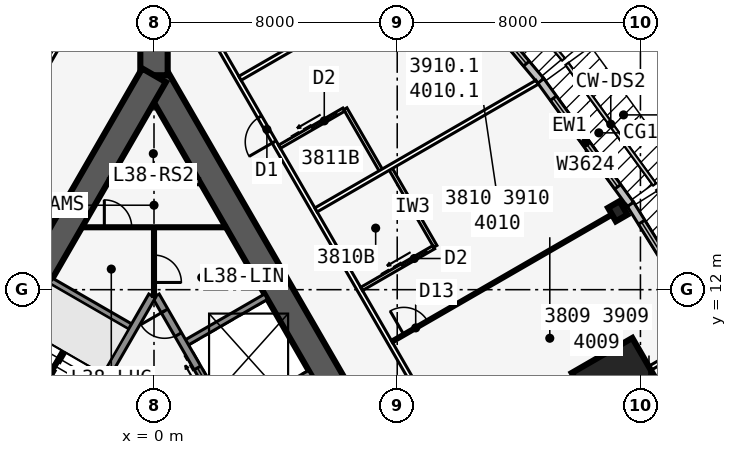
"""IFC4 building model, lengths in metres.
Left out: names, types, materials, properties, quantities, classifications, styles, units other than length and angle.
Written with IfcOpenShell. Run it as: python <this file> out.ifc"""

import sys

from ifc_helpers import new_model, si_unit, direction, frame, frame_2d, origin, origin_2d, place, context, subcontext, project, spatial, rectangle, i_section, extrude, element, fill, save


model = new_model("IFC4")
c1 = context("Model", 3, precision=1e-05, world=origin(), true_north=direction((0.0, 1.0)))
c2 = subcontext(c1, "Body", "Model", "MODEL_VIEW")
j1 = project(units=[si_unit("LENGTHUNIT", "METRE"), si_unit("PLANEANGLEUNIT", "RADIAN")], contexts=[c1])
p1 = place(None, origin())
s1 = spatial("IfcSite", under=j1, at=p1, CompositionType="ELEMENT")
p2 = place(p1, origin())
s2 = spatial("IfcBuilding", under=s1, at=p2, CompositionType="ELEMENT")
p3 = place(p2, frame((0.0, 0.0, 145.3)))
s3 = spatial("IfcBuildingStorey", under=s2, at=p3, CompositionType="ELEMENT", Elevation=145.3)
p4 = place(p3, frame((16.5, -9.526, 0.0), z_axis=(0.0, 0.0, 1.0), x_axis=(-0.499999749417, 0.866025548458, 0.0)))
e1 = element("IfcWall", 1, at=p4, inside=s3, PredefinedType="SHEAR", context=c2, shape_type="SweptSolid", body=[
    extrude(rectangle(XDim=33.0, YDim=0.9, at=frame_2d((16.5, 0.0))), origin(), (0.0, 0.0, 1.0), 3.4),
])
p5 = place(p4, frame((14.15, 0.0, 0.0)))
e2 = element("IfcOpeningElement", 2, at=p5, cuts=e1, PredefinedType="OPENING", context=c2, shape_type="SweptSolid", body=[
    extrude(rectangle(XDim=1.8, YDim=2.13, at=frame_2d((0.9, 1.065))), frame((0.0, 0.46, 0.0), z_axis=(0.0, -1.0, 0.0), x_axis=(1.0, 0.0, 0.0)), (0.0, 0.0, 1.0), 0.92),
])
p6 = place(p4, frame((12.6, 0.0, 0.0)))
e3 = element("IfcOpeningElement", 3, at=p6, cuts=e1, PredefinedType="OPENING", context=c2, shape_type="SweptSolid", body=[
    extrude(rectangle(XDim=1.0, YDim=2.13, at=frame_2d((0.5, 1.065))), frame((0.0, 0.46, 0.0), z_axis=(0.0, -1.0, 0.0), x_axis=(1.0, 0.0, 0.0)), (0.0, 0.0, 1.0), 0.92),
])
p7 = place(p3, frame((5.379, 2.586, 0.0), z_axis=(0.0, 0.0, 1.0), x_axis=(-0.500001375892, 0.866024609411, 0.0)))
e4 = element("IfcWall", 4, at=p7, inside=s3, PredefinedType="SOLIDWALL", context=c2, shape_type="SweptSolid", body=[
    extrude(rectangle(XDim=10.633, YDim=0.25, at=frame_2d((5.316, 0.0))), origin(), (0.0, 0.0, 1.0), 3.235),
])
p8 = place(p7, frame((9.164, 0.0, 0.0)))
e5 = element("IfcOpeningElement", 5, at=p8, cuts=e4, PredefinedType="OPENING", context=c2, shape_type="SweptSolid", body=[
    extrude(rectangle(XDim=0.9, YDim=2.13, at=frame_2d((0.45, 1.065))), frame((0.0, 0.135, 0.0), z_axis=(0.0, -1.0, 0.0), x_axis=(1.0, 0.0, 0.0)), (0.0, 0.0, 1.0), 0.27),
])
p9 = place(p7, frame((1.0, 0.0, 0.0)))
e6 = element("IfcOpeningElement", 6, at=p9, cuts=e4, PredefinedType="OPENING", context=c2, shape_type="SweptSolid", body=[
    extrude(rectangle(XDim=1.1, YDim=2.13, at=frame_2d((0.55, 1.065))), frame((0.0, 0.135, 0.0), z_axis=(0.0, -1.0, 0.0), x_axis=(1.0, 0.0, 0.0)), (0.0, 0.0, 1.0), 0.27),
])
p10 = place(p7, frame((3.9, 0.0, 0.0)))
e7 = element("IfcOpeningElement", 7, at=p10, cuts=e4, PredefinedType="OPENING", context=c2, shape_type="SweptSolid", body=[
    extrude(rectangle(XDim=1.1, YDim=2.13, at=frame_2d((0.55, 1.065))), frame((0.0, 0.135, 0.0), z_axis=(0.0, -1.0, 0.0), x_axis=(1.0, 0.0, 0.0)), (0.0, 0.0, 1.0), 0.27),
])
p11 = place(p7, frame((6.8, 0.0, 0.0)))
e8 = element("IfcOpeningElement", 8, at=p11, cuts=e4, PredefinedType="OPENING", context=c2, shape_type="SweptSolid", body=[
    extrude(rectangle(XDim=1.1, YDim=2.13, at=frame_2d((0.55, 1.065))), frame((0.0, 0.135, 0.0), z_axis=(0.0, -1.0, 0.0), x_axis=(1.0, 0.0, 0.0)), (0.0, 0.0, 1.0), 0.27),
])
for number, where, z_axis, x_axis in (
    (9, (2.429, 7.696, 0.0), (0.0, 0.0, 1.0), (0.866, 0.5, 0.0)),
    (10, (0.979, 10.207, 0.0), (0.0, 0.0, 1.0), (0.866, 0.5, 0.0)),
):
    element("IfcWall", number, at=place(p3, frame(where, z_axis=z_axis, x_axis=x_axis)), inside=s3, PredefinedType="SOLIDWALL", context=c2, shape_type="SweptSolid", body=[
        extrude(rectangle(XDim=3.125, YDim=0.2, at=frame_2d((1.562, 0.0))), origin(), (0.0, 0.0, 1.0), 3.235),
    ])
p12 = place(p3, frame((0.0, 19.052, 0.0), z_axis=(0.0, 0.0, 1.0), x_axis=(-0.499999749417, -0.866025548458, 0.0)))
e11 = element("IfcWall", 11, at=p12, inside=s3, PredefinedType="SHEAR", context=c2, shape_type="SweptSolid", body=[
    extrude(rectangle(XDim=33.0, YDim=0.9, at=frame_2d((16.5, 0.0))), origin(), (0.0, 0.0, 1.0), 3.4),
])
p13 = place(p12, frame((14.15, 0.0, 0.0)))
e12 = element("IfcOpeningElement", 12, at=p13, cuts=e11, PredefinedType="OPENING", context=c2, shape_type="SweptSolid", body=[
    extrude(rectangle(XDim=1.8, YDim=2.13, at=frame_2d((0.9, 1.065))), frame((0.0, 0.46, 0.0), z_axis=(0.0, -1.0, 0.0), x_axis=(1.0, 0.0, 0.0)), (0.0, 0.0, 1.0), 0.92),
])
p14 = place(p12, frame((12.6, 0.0, 0.0)))
e13 = element("IfcOpeningElement", 13, at=p14, cuts=e11, PredefinedType="OPENING", context=c2, shape_type="SweptSolid", body=[
    extrude(rectangle(XDim=1.0, YDim=2.13, at=frame_2d((0.5, 1.065))), frame((0.0, 0.46, 0.0), z_axis=(0.0, -1.0, 0.0), x_axis=(1.0, 0.0, 0.0)), (0.0, 0.0, 1.0), 0.92),
])
p15 = place(p3, frame((-0.062, 11.794, 0.0), z_axis=(0.0, 0.0, 1.0), x_axis=(-0.500006680225, -0.86602154692, 0.0)))
e14 = element("IfcWall", 14, at=p15, inside=s3, PredefinedType="SOLIDWALL", context=c2, shape_type="SweptSolid", body=[
    extrude(rectangle(XDim=7.733, YDim=0.25, at=frame_2d((3.866, 0.0))), origin(), (0.0, 0.0, 1.0), 3.235),
])
p16 = place(p3, frame((-0.679, 10.727, 0.0), z_axis=(0.0, 0.0, 1.0), x_axis=(-0.866022959057, 0.500004234368, 0.0)))
e15 = element("IfcWall", 15, at=p16, inside=s3, PredefinedType="SOLIDWALL", context=c2, shape_type="SweptSolid", body=[
    extrude(rectangle(XDim=3.125, YDim=0.2, at=frame_2d((1.562, 0.0))), origin(), (0.0, 0.0, 1.0), 3.235),
])
p17 = place(p3, frame((0.0, 19.052, 0.0), z_axis=(0.0, 0.0, 1.0), x_axis=(0.0, 1.0, 0.0)))
e16 = element("IfcWall", 16, at=p17, inside=s3, PredefinedType="SHEAR", context=c2, shape_type="SweptSolid", body=[
    extrude(rectangle(XDim=4.746, YDim=0.9, at=frame_2d((2.373, 0.0))), origin(), (0.0, 0.0, 1.0), 3.4),
])
p18 = place(p17, frame((1.8, 0.0, 0.0)))
e17 = element("IfcOpeningElement", 17, at=p18, cuts=e16, PredefinedType="OPENING", context=c2, shape_type="SweptSolid", body=[
    extrude(rectangle(XDim=1.8, YDim=2.13, at=frame_2d((0.9, 1.065))), frame((0.0, 0.46, 0.0), z_axis=(0.0, -1.0, 0.0), x_axis=(1.0, 0.0, 0.0)), (0.0, 0.0, 1.0), 0.92),
])
p19 = place(p3, frame((15.254, 14.58, 0.0), z_axis=(0.0, 0.0, 1.0), x_axis=(0.866025403784, 0.5, 0.0)))
e18 = element("IfcColumn", 18, at=p19, inside=s3, PredefinedType="COLUMN", context=c2, shape_type="SweptSolid", body=[
    extrude(i_section(OverallWidth=0.437, OverallDepth=0.513, WebThickness=0.061, FlangeThickness=0.097, at=origin_2d()), origin(), (0.0, 0.0, 1.0), 3.4),
])
p20 = place(p3, frame((15.312, 8.84, 0.0), z_axis=(0.0, 0.0, 1.0), x_axis=(0.866025403784, 0.5, 0.0)))
e19 = element("IfcColumn", 19, at=p20, inside=s3, PredefinedType="COLUMN", context=c2, shape_type="SweptSolid", body=[
    extrude(rectangle(XDim=2.3, YDim=2.3, at=origin_2d()), origin(), (0.0, 0.0, 1.0), 3.4),
])
p21 = place(p3, frame((18.319, 10.571, 0.0), z_axis=(0.0, 0.0, 1.0), x_axis=(-0.529990167382, 0.84800378683, 0.0)))
e20 = element("IfcWall", 20, at=p21, inside=s3, PredefinedType="STANDARD", context=c2, shape_type="SweptSolid", body=[
    extrude(rectangle(XDim=5.003, YDim=0.25, at=frame_2d((2.501, 0.0))), origin(), (0.0, 0.0, 1.0), 3.235),
])
p22 = place(p21, frame((0.701, 0.0, 0.45)))
e21 = element("IfcOpeningElement", 21, at=p22, cuts=e20, PredefinedType="OPENING", context=c2, shape_type="SweptSolid", body=[
    extrude(rectangle(XDim=3.6, YDim=2.4, at=frame_2d((1.8, 1.2))), frame((0.0, 0.135, 0.0), z_axis=(0.0, -1.0, 0.0), x_axis=(1.0, 0.0, 0.0)), (0.0, 0.0, 1.0), 0.27),
])
p23 = place(p3, frame((15.672, 14.807, 0.0), z_axis=(0.0, 0.0, 1.0), x_axis=(-0.587669188412, 0.809101307001, 0.0)))
e22 = element("IfcWall", 22, at=p23, inside=s3, PredefinedType="STANDARD", context=c2, shape_type="SweptSolid", body=[
    extrude(rectangle(XDim=5.028, YDim=0.25, at=frame_2d((2.514, 0.0))), origin(), (0.0, 0.0, 1.0), 3.235),
])
p24 = place(p23, frame((0.714, 0.0, 0.45)))
e23 = element("IfcOpeningElement", 23, at=p24, cuts=e22, PredefinedType="OPENING", context=c2, shape_type="SweptSolid", body=[
    extrude(rectangle(XDim=3.6, YDim=2.4, at=frame_2d((1.8, 1.2))), frame((0.0, 0.135, 0.0), z_axis=(0.0, -1.0, 0.0), x_axis=(1.0, 0.0, 0.0)), (0.0, 0.0, 1.0), 0.27),
])
p25 = place(p3, frame((12.723, 18.868, 0.0), z_axis=(0.0, 0.0, 1.0), x_axis=(-0.641810386606, 0.766863369607, 0.0)))
e24 = element("IfcWall", 24, at=p25, inside=s3, PredefinedType="STANDARD", context=c2, shape_type="SweptSolid", body=[
    extrude(rectangle(XDim=5.076, YDim=0.25, at=frame_2d((2.538, 0.0))), origin(), (0.0, 0.0, 1.0), 3.235),
])
p26 = place(p25, frame((0.738, 0.0, 0.45)))
e25 = element("IfcOpeningElement", 25, at=p26, cuts=e24, PredefinedType="OPENING", context=c2, shape_type="SweptSolid", body=[
    extrude(rectangle(XDim=3.6, YDim=2.4, at=frame_2d((1.8, 1.2))), frame((0.0, 0.135, 0.0), z_axis=(0.0, -1.0, 0.0), x_axis=(1.0, 0.0, 0.0)), (0.0, 0.0, 1.0), 0.27),
])
p27 = place(p3, frame((20.027, -10.985, 0.0), z_axis=(0.0, 0.0, 1.0), x_axis=(-0.500001677587, 0.866024435227, 0.0)))
e26 = element("IfcWall", 26, at=p27, inside=s3, PredefinedType="PARTITIONING", context=c2, shape_type="SweptSolid", body=[
    extrude(rectangle(XDim=39.054, YDim=0.15, at=frame_2d((19.527, 0.0))), origin(), (0.0, 0.0, 1.0), 3.235),
])
p28 = place(p27, frame((0.352, 0.0, 0.0)))
e27 = element("IfcOpeningElement", 27, at=p28, cuts=e26, PredefinedType="OPENING", context=c2, shape_type="SweptSolid", body=[
    extrude(rectangle(XDim=0.95, YDim=2.13, at=frame_2d((0.475, 1.065))), frame((0.0, 0.085, 0.0), z_axis=(0.0, -1.0, 0.0), x_axis=(1.0, 0.0, 0.0)), (0.0, 0.0, 1.0), 0.17),
])
p29 = place(p27, frame((6.552, 0.0, 0.0)))
e28 = element("IfcOpeningElement", 28, at=p29, cuts=e26, PredefinedType="OPENING", context=c2, shape_type="SweptSolid", body=[
    extrude(rectangle(XDim=0.95, YDim=2.13, at=frame_2d((0.475, 1.065))), frame((0.0, 0.085, 0.0), z_axis=(0.0, -1.0, 0.0), x_axis=(1.0, 0.0, 0.0)), (0.0, 0.0, 1.0), 0.17),
])
p30 = place(p27, frame((17.152, 0.0, 0.0)))
e29 = element("IfcOpeningElement", 29, at=p30, cuts=e26, PredefinedType="OPENING", context=c2, shape_type="SweptSolid", body=[
    extrude(rectangle(XDim=0.95, YDim=2.13, at=frame_2d((0.475, 1.065))), frame((0.0, 0.085, 0.0), z_axis=(0.0, -1.0, 0.0), x_axis=(1.0, 0.0, 0.0)), (0.0, 0.0, 1.0), 0.17),
])
p31 = place(p27, frame((21.552, 0.0, 0.0)))
e30 = element("IfcOpeningElement", 30, at=p31, cuts=e26, PredefinedType="OPENING", context=c2, shape_type="SweptSolid", body=[
    extrude(rectangle(XDim=0.95, YDim=2.13, at=frame_2d((0.475, 1.065))), frame((0.0, 0.085, 0.0), z_axis=(0.0, -1.0, 0.0), x_axis=(1.0, 0.0, 0.0)), (0.0, 0.0, 1.0), 0.17),
])
p32 = place(p27, frame((32.152, 0.0, 0.0)))
e31 = element("IfcOpeningElement", 31, at=p32, cuts=e26, PredefinedType="OPENING", context=c2, shape_type="SweptSolid", body=[
    extrude(rectangle(XDim=0.95, YDim=2.13, at=frame_2d((0.475, 1.065))), frame((0.0, 0.085, 0.0), z_axis=(0.0, -1.0, 0.0), x_axis=(1.0, 0.0, 0.0)), (0.0, 0.0, 1.0), 0.17),
])
p33 = place(p27, frame((37.752, 0.0, 0.0)))
e32 = element("IfcOpeningElement", 32, at=p33, cuts=e26, PredefinedType="OPENING", context=c2, shape_type="SweptSolid", body=[
    extrude(rectangle(XDim=0.95, YDim=2.13, at=frame_2d((0.475, 1.065))), frame((0.0, 0.085, 0.0), z_axis=(0.0, -1.0, 0.0), x_axis=(1.0, 0.0, 0.0)), (0.0, 0.0, 1.0), 0.17),
])
p34 = place(p3, frame((10.329, 5.963, 0.0), z_axis=(0.0, 0.0, 1.0), x_axis=(0.866025170687, 0.500000403736, 0.0)))
e33 = element("IfcWall", 33, at=p34, inside=s3, PredefinedType="PARTITIONING", context=c2, shape_type="SweptSolid", body=[
    extrude(rectangle(XDim=9.099, YDim=0.15, at=frame_2d((4.549, 0.0))), origin(), (0.0, 0.0, 1.0), 2.389),
])
p35 = place(p3, frame((7.829, 10.293, 0.0), z_axis=(0.0, 0.0, 1.0), x_axis=(0.866027015393, 0.499997208602, 0.0)))
e34 = element("IfcWall", 34, at=p35, inside=s3, PredefinedType="PARTITIONING", context=c2, shape_type="SweptSolid", body=[
    extrude(rectangle(XDim=8.922, YDim=0.1, at=frame_2d((4.461, 0.0))), origin(), (0.0, 0.0, 1.0), 2.389),
])
p36 = place(p35, frame((0.45, 0.0, 0.0)))
e35 = element("IfcOpeningElement", 35, at=p36, cuts=e34, PredefinedType="OPENING", context=c2, shape_type="SweptSolid", body=[
    extrude(rectangle(XDim=0.9, YDim=2.13, at=frame_2d((0.45, 1.065))), frame((0.0, 0.06, 0.0), z_axis=(0.0, -1.0, 0.0), x_axis=(1.0, 0.0, 0.0)), (0.0, 0.0, 1.0), 0.12),
])
p37 = place(p3, frame((5.329, 14.623, 0.0), z_axis=(0.0, 0.0, 1.0), x_axis=(0.866011723728, 0.500023693804, 0.0)))
e36 = element("IfcWall", 36, at=p37, inside=s3, PredefinedType="PARTITIONING", context=c2, shape_type="SweptSolid", body=[
    extrude(rectangle(XDim=8.395, YDim=0.15, at=frame_2d((4.198, 0.0))), origin(), (0.0, 0.0, 1.0), 2.389),
])
p38 = place(p3, frame((2.829, 18.954, 0.0), z_axis=(0.0, 0.0, 1.0), x_axis=(0.866015739374, 0.500016738876, 0.0)))
e37 = element("IfcWall", 37, at=p38, inside=s3, PredefinedType="PARTITIONING", context=c2, shape_type="SweptSolid", body=[
    extrude(rectangle(XDim=7.516, YDim=0.15, at=frame_2d((3.758, 0.0))), origin(), (0.0, 0.0, 1.0), 2.389),
])
p39 = place(p3, frame((9.253, 13.425, 0.0), z_axis=(0.0, 0.0, 1.0), x_axis=(-0.499990139034, 0.866031096941, 0.0)))
e38 = element("IfcWall", 38, at=p39, inside=s3, PredefinedType="PLUMBINGWALL", context=c2, shape_type="SweptSolid", body=[
    extrude(rectangle(XDim=3.0, YDim=0.12, at=frame_2d((1.5, 0.0))), origin(), (0.0, 0.0, 1.0), 3.235),
])
p40 = place(p3, frame((6.829, 12.025, 0.0), z_axis=(0.0, 0.0, 1.0), x_axis=(0.866035715982, 0.499982138324, 0.0)))
e39 = element("IfcWall", 39, at=p40, inside=s3, PredefinedType="PLUMBINGWALL", context=c2, shape_type="SweptSolid", body=[
    extrude(rectangle(XDim=2.74, YDim=0.12, at=frame_2d((1.37, 0.0))), origin(), (0.0, 0.0, 1.0), 3.235),
])
p41 = place(p40, frame((1.55, 0.0, 0.0)))
e40 = element("IfcOpeningElement", 40, at=p41, cuts=e39, PredefinedType="OPENING", context=c2, shape_type="SweptSolid", body=[
    extrude(rectangle(XDim=0.9, YDim=2.13, at=frame_2d((0.45, 1.065))), frame((0.0, 0.07, 0.0), z_axis=(0.0, -1.0, 0.0), x_axis=(1.0, 0.0, 0.0)), (0.0, 0.0, 1.0), 0.14),
])
p42 = place(p3, frame((7.493, 15.873, 0.0), z_axis=(0.0, 0.0, 1.0), x_axis=(-0.499957262057, 0.866050077142, 0.0)))
e41 = element("IfcWall", 41, at=p42, inside=s3, PredefinedType="PLUMBINGWALL", context=c2, shape_type="SweptSolid", body=[
    extrude(rectangle(XDim=2.4, YDim=0.12, at=frame_2d((1.2, 0.0))), origin(), (0.0, 0.0, 1.0), 3.235),
])
p43 = place(p3, frame((4.128, 16.702, 0.0), z_axis=(0.0, 0.0, 1.0), x_axis=(0.866048967903, 0.499959183527, 0.0)))
e42 = element("IfcWall", 42, at=p43, inside=s3, PredefinedType="PLUMBINGWALL", context=c2, shape_type="SweptSolid", body=[
    extrude(rectangle(XDim=2.44, YDim=0.12, at=frame_2d((1.22, 0.0))), origin(), (0.0, 0.0, 1.0), 3.235),
])
p44 = place(p43, frame((1.25, 0.0, 0.0)))
e43 = element("IfcOpeningElement", 43, at=p44, cuts=e42, PredefinedType="OPENING", context=c2, shape_type="SweptSolid", body=[
    extrude(rectangle(XDim=0.9, YDim=2.13, at=frame_2d((0.45, 1.065))), frame((0.0, 0.07, 0.0), z_axis=(0.0, -1.0, 0.0), x_axis=(1.0, 0.0, 0.0)), (0.0, 0.0, 1.0), 0.14),
])
p45 = place(p3, frame((-0.5, 24.636, 0.0), z_axis=(0.0, 0.0, 1.0), x_axis=(-0.500001915564, -0.86602429783, 0.0)))
e44 = element("IfcWall", 44, at=p45, inside=s3, PredefinedType="PARTITIONING", context=c2, shape_type="SweptSolid", body=[
    extrude(rectangle(XDim=42.172, YDim=0.15, at=frame_2d((21.086, 0.0))), origin(), (0.0, 0.0, 1.0), 3.235),
])
p46 = place(p45, frame((1.911, 0.0, 0.0)))
e45 = element("IfcOpeningElement", 45, at=p46, cuts=e44, PredefinedType="OPENING", context=c2, shape_type="SweptSolid", body=[
    extrude(rectangle(XDim=0.95, YDim=2.13, at=frame_2d((0.475, 1.065))), frame((0.0, 0.085, 0.0), z_axis=(0.0, -1.0, 0.0), x_axis=(1.0, 0.0, 0.0)), (0.0, 0.0, 1.0), 0.17),
])
p47 = place(p45, frame((9.311, 0.0, 0.0)))
e46 = element("IfcOpeningElement", 46, at=p47, cuts=e44, PredefinedType="OPENING", context=c2, shape_type="SweptSolid", body=[
    extrude(rectangle(XDim=0.95, YDim=2.13, at=frame_2d((0.475, 1.065))), frame((0.0, 0.085, 0.0), z_axis=(0.0, -1.0, 0.0), x_axis=(1.0, 0.0, 0.0)), (0.0, 0.0, 1.0), 0.17),
])
p48 = place(p45, frame((18.111, 0.0, 0.0)))
e47 = element("IfcOpeningElement", 47, at=p48, cuts=e44, PredefinedType="OPENING", context=c2, shape_type="SweptSolid", body=[
    extrude(rectangle(XDim=0.95, YDim=2.13, at=frame_2d((0.475, 1.065))), frame((0.0, 0.085, 0.0), z_axis=(0.0, -1.0, 0.0), x_axis=(1.0, 0.0, 0.0)), (0.0, 0.0, 1.0), 0.17),
])
p49 = place(p45, frame((29.311, 0.0, 0.0)))
e48 = element("IfcOpeningElement", 48, at=p49, cuts=e44, PredefinedType="OPENING", context=c2, shape_type="SweptSolid", body=[
    extrude(rectangle(XDim=0.95, YDim=2.13, at=frame_2d((0.475, 1.065))), frame((0.0, 0.085, 0.0), z_axis=(0.0, -1.0, 0.0), x_axis=(1.0, 0.0, 0.0)), (0.0, 0.0, 1.0), 0.17),
])
p50 = place(p45, frame((39.311, 0.0, 0.0)))
e49 = element("IfcOpeningElement", 49, at=p50, cuts=e44, PredefinedType="OPENING", context=c2, shape_type="SweptSolid", body=[
    extrude(rectangle(XDim=0.95, YDim=2.13, at=frame_2d((0.475, 1.065))), frame((0.0, 0.085, 0.0), z_axis=(0.0, -1.0, 0.0), x_axis=(1.0, 0.0, 0.0)), (0.0, 0.0, 1.0), 0.17),
])
p51 = place(p3, frame((-1.501, 15.552, 0.0), z_axis=(0.0, 0.0, 1.0), x_axis=(1.0, 0.0, 0.0)))
e50 = element("IfcWall", 50, at=p51, inside=s3, PredefinedType="SOLIDWALL", context=c2, shape_type="SweptSolid", body=[
    extrude(rectangle(XDim=3.002, YDim=0.2, at=frame_2d((1.501, 0.0))), origin(), (0.0, 0.0, 1.0), 3.235),
])
p52 = place(p3, frame((-2.367, 14.052, 0.0), z_axis=(0.0, 0.0, 1.0), x_axis=(1.0, 0.0, 0.0)))
e51 = element("IfcWall", 51, at=p52, inside=s3, PredefinedType="PARTITIONING", context=c2, shape_type="SweptSolid", body=[
    extrude(rectangle(XDim=4.734, YDim=0.1, at=frame_2d((2.367, 0.0))), origin(), (0.0, 0.0, 1.0), 3.235),
])
p53 = place(p52, frame((0.734, 0.0, 0.0)))
e52 = element("IfcOpeningElement", 52, at=p53, cuts=e51, PredefinedType="OPENING", context=c2, shape_type="SweptSolid", body=[
    extrude(rectangle(XDim=0.9, YDim=2.13, at=frame_2d((0.45, 1.065))), frame((0.0, 0.06, 0.0), z_axis=(0.0, -1.0, 0.0), x_axis=(1.0, 0.0, 0.0)), (0.0, 0.0, 1.0), 0.12),
])
p54 = place(p3, frame((0.0, 14.052, 0.0), z_axis=(0.0, 0.0, 1.0), x_axis=(0.0, -1.0, 0.0)))
e53 = element("IfcWall", 53, at=p54, inside=s3, PredefinedType="PARTITIONING", context=c2, shape_type="SweptSolid", body=[
    extrude(rectangle(XDim=2.275, YDim=0.1, at=frame_2d((1.138, 0.0))), origin(), (0.0, 0.0, 1.0), 3.235),
])
p55 = place(p54, frame((0.915, 0.0, 0.0)))
e54 = element("IfcOpeningElement", 54, at=p55, cuts=e53, PredefinedType="OPENING", context=c2, shape_type="SweptSolid", body=[
    extrude(rectangle(XDim=0.9, YDim=2.13, at=frame_2d((0.45, 1.065))), frame((0.0, 0.06, 0.0), z_axis=(0.0, -1.0, 0.0), x_axis=(1.0, 0.0, 0.0)), (0.0, 0.0, 1.0), 0.12),
])
p56 = place(p3, frame((-2.988, 9.978, 0.0), z_axis=(0.0, 0.0, 1.0), x_axis=(-0.499992232847, -0.866029888106, 0.0)))
e55 = element("IfcWall", 55, at=p56, inside=s3, PredefinedType="SOLIDWALL", context=c2, shape_type="SweptSolid", body=[
    extrude(rectangle(XDim=2.794, YDim=0.1, at=frame_2d((1.397, 0.0))), origin(), (0.0, 0.0, 1.0), 3.4),
])
p57 = place(p22, origin())
e56 = element("IfcWindow", 56, at=p57, inside=s3, PartitioningType="SINGLE_PANEL", PredefinedType="WINDOW", context=c2, shape_type="SweptSolid", body=[
    extrude(rectangle(XDim=3.6, YDim=2.4, at=frame_2d((1.8, 1.2))), frame((0.0, 0.03, 0.0), z_axis=(0.0, -1.0, 0.0), x_axis=(1.0, 0.0, 0.0)), (0.0, 0.0, 1.0), 0.06),
])
fill(e21, e56)
p58 = place(p24, origin())
e57 = element("IfcWindow", 57, at=p58, inside=s3, PartitioningType="SINGLE_PANEL", PredefinedType="WINDOW", context=c2, shape_type="SweptSolid", body=[
    extrude(rectangle(XDim=3.6, YDim=2.4, at=frame_2d((1.8, 1.2))), frame((0.0, 0.03, 0.0), z_axis=(0.0, -1.0, 0.0), x_axis=(1.0, 0.0, 0.0)), (0.0, 0.0, 1.0), 0.06),
])
fill(e23, e57)
p59 = place(p26, origin())
e58 = element("IfcWindow", 58, at=p59, inside=s3, PartitioningType="SINGLE_PANEL", PredefinedType="WINDOW", context=c2, shape_type="SweptSolid", body=[
    extrude(rectangle(XDim=3.6, YDim=2.4, at=frame_2d((1.8, 1.2))), frame((0.0, 0.03, 0.0), z_axis=(0.0, -1.0, 0.0), x_axis=(1.0, 0.0, 0.0)), (0.0, 0.0, 1.0), 0.06),
])
fill(e25, e58)
p60 = place(p36, origin())
e59 = element("IfcDoor", 59, at=p60, inside=s3, OperationType="SINGLE_SWING_LEFT", PredefinedType="DOOR", context=c2, shape_type="SweptSolid", body=[
    extrude(rectangle(XDim=0.9, YDim=2.13, at=frame_2d((0.45, 1.065))), frame((0.0, 0.025, 0.0), z_axis=(0.0, -1.0, 0.0), x_axis=(1.0, 0.0, 0.0)), (0.0, 0.0, 1.0), 0.05),
])
fill(e35, e59)
p61 = place(p41, origin())
e60 = element("IfcDoor", 60, at=p61, inside=s3, OperationType="SLIDING_TO_LEFT", PredefinedType="DOOR", context=c2, shape_type="SweptSolid", body=[
    extrude(rectangle(XDim=0.9, YDim=2.13, at=frame_2d((0.45, 1.065))), frame((0.0, 0.025, 0.0), z_axis=(0.0, -1.0, 0.0), x_axis=(1.0, 0.0, 0.0)), (0.0, 0.0, 1.0), 0.05),
])
fill(e40, e60)
p62 = place(p44, origin())
e61 = element("IfcDoor", 61, at=p62, inside=s3, OperationType="SLIDING_TO_LEFT", PredefinedType="DOOR", context=c2, shape_type="SweptSolid", body=[
    extrude(rectangle(XDim=0.9, YDim=2.13, at=frame_2d((0.45, 1.065))), frame((0.0, 0.025, 0.0), z_axis=(0.0, -1.0, 0.0), x_axis=(1.0, 0.0, 0.0)), (0.0, 0.0, 1.0), 0.05),
])
fill(e43, e61)
p63 = place(p32, origin())
e62 = element("IfcDoor", 62, at=p63, inside=s3, OperationType="SINGLE_SWING_LEFT", PredefinedType="DOOR", context=c2, shape_type="SweptSolid", body=[
    extrude(rectangle(XDim=0.95, YDim=2.13, at=frame_2d((0.475, 1.065))), frame((0.0, 0.025, 0.0), z_axis=(0.0, -1.0, 0.0), x_axis=(1.0, 0.0, 0.0)), (0.0, 0.0, 1.0), 0.05),
])
fill(e31, e62)
p64 = place(p53, origin())
e63 = element("IfcDoor", 63, at=p64, inside=s3, OperationType="SINGLE_SWING_LEFT", PredefinedType="DOOR", context=c2, shape_type="SweptSolid", body=[
    extrude(rectangle(XDim=0.9, YDim=2.13, at=frame_2d((0.45, 1.065))), frame((0.0, 0.025, 0.0), z_axis=(0.0, -1.0, 0.0), x_axis=(1.0, 0.0, 0.0)), (0.0, 0.0, 1.0), 0.05),
])
fill(e52, e63)
p65 = place(p8, origin())
e64 = element("IfcDoor", 64, at=p65, inside=s3, OperationType="SINGLE_SWING_RIGHT", PredefinedType="DOOR", context=c2, shape_type="SweptSolid", body=[
    extrude(rectangle(XDim=0.9, YDim=2.13, at=frame_2d((0.45, 1.065))), frame((0.0, 0.025, 0.0), z_axis=(0.0, -1.0, 0.0), x_axis=(1.0, 0.0, 0.0)), (0.0, 0.0, 1.0), 0.05),
])
fill(e5, e64)
p66 = place(p55, origin())
e65 = element("IfcDoor", 65, at=p66, inside=s3, OperationType="SINGLE_SWING_RIGHT", PredefinedType="DOOR", context=c2, shape_type="SweptSolid", body=[
    extrude(rectangle(XDim=0.9, YDim=2.13, at=frame_2d((0.45, 1.065))), frame((0.0, 0.025, 0.0), z_axis=(0.0, -1.0, 0.0), x_axis=(1.0, 0.0, 0.0)), (0.0, 0.0, 1.0), 0.05),
])
fill(e54, e65)
p67 = place(p11, origin())
e66 = element("IfcDoor", 66, at=p67, inside=s3, OperationType="DOUBLE_DOOR_SLIDING", PredefinedType="USERDEFINED", context=c2, shape_type="SweptSolid", body=[
    extrude(rectangle(XDim=1.1, YDim=2.13, at=frame_2d((0.55, 1.065))), frame((0.0, 0.025, 0.0), z_axis=(0.0, -1.0, 0.0), x_axis=(1.0, 0.0, 0.0)), (0.0, 0.0, 1.0), 0.05),
])
fill(e8, e66)
save(model, sys.argv[1])
